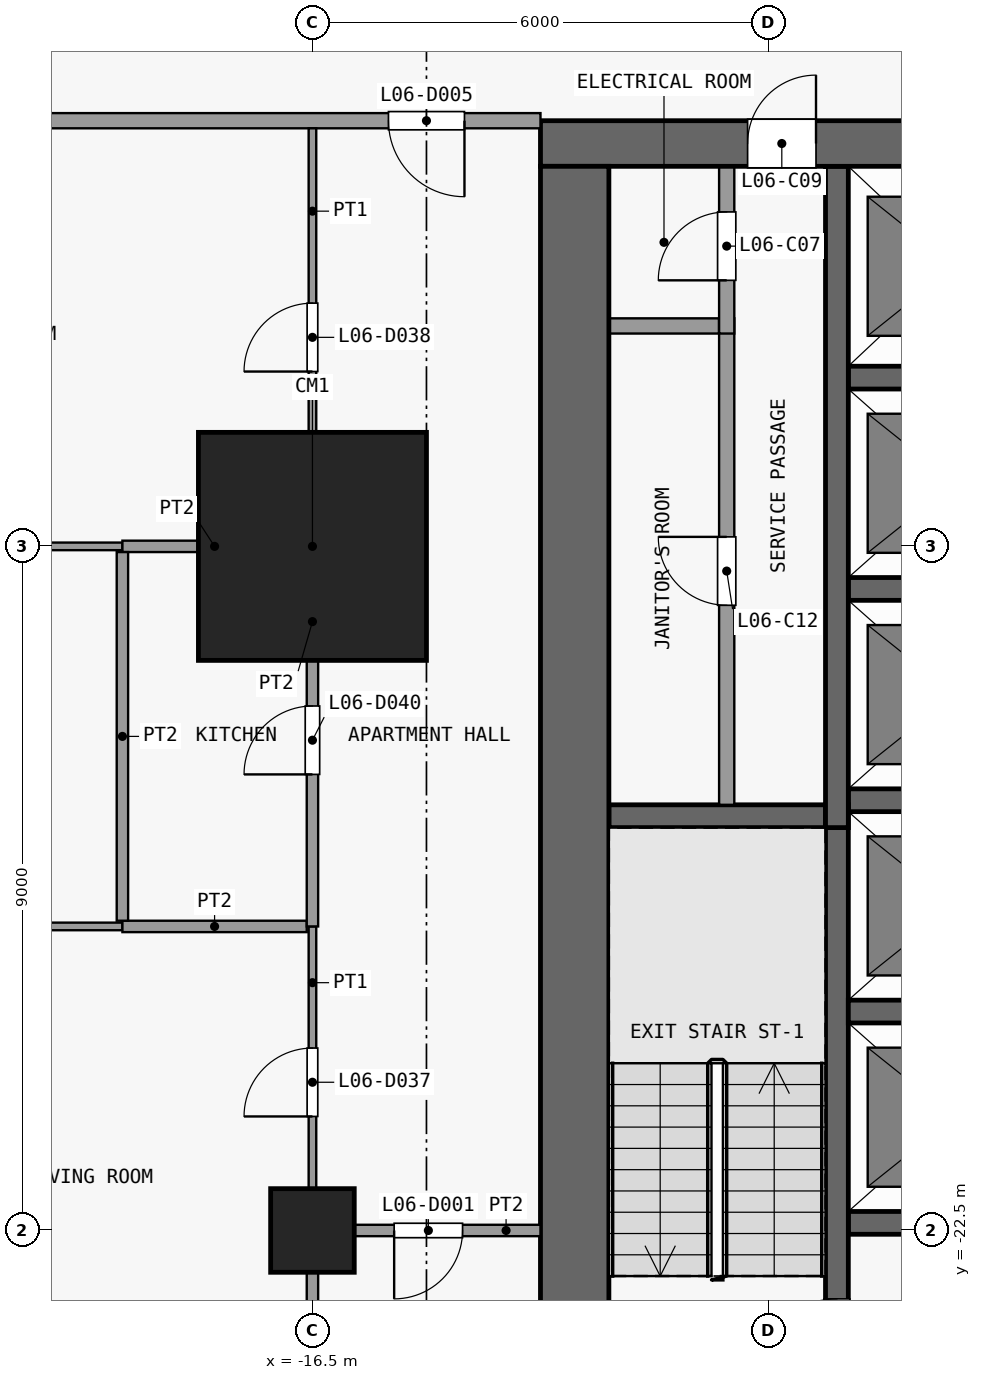
"""IFC4 building model, lengths in metres.
Left out: names, types, materials, properties, quantities, classifications, styles, units other than length and angle.
Written with IfcOpenShell. Run it as: python <this file> out.ifc"""

import sys

from ifc_helpers import new_model, si_unit, direction, frame, frame_2d, origin, origin_2d, place, context, subcontext, project, spatial, rectangle, extrude, element, fill, save


model = new_model("IFC4")
c1 = context("Model", 3, precision=1e-05, world=origin(), true_north=direction((0.0, 1.0)))
c2 = subcontext(c1, "Body", "Model", "MODEL_VIEW")
j1 = project(units=[si_unit("LENGTHUNIT", "METRE"), si_unit("PLANEANGLEUNIT", "RADIAN")], contexts=[c1])
p1 = place(None, origin())
s1 = spatial("IfcSite", under=j1, at=p1, CompositionType="ELEMENT")
p2 = place(p1, origin())
s2 = spatial("IfcBuilding", under=s1, at=p2, CompositionType="ELEMENT")
p3 = place(p2, frame((0.0, 0.0, 32.5)))
s3 = spatial("IfcBuildingStorey", under=s2, at=p3, CompositionType="ELEMENT", Elevation=32.5)
p4 = place(p3, frame((-16.5, -22.5, 0.0), z_axis=(0.0, 0.0, 1.0), x_axis=(1.0, 0.0, 0.0)))
e1 = element("IfcColumn", 1, at=p4, inside=s3, PredefinedType="COLUMN", context=c2, shape_type="SweptSolid", body=[
    extrude(rectangle(XDim=1.1, YDim=1.1, at=origin_2d()), origin(), (0.0, 0.0, 1.0), 3.6),
])
p5 = place(p3, frame((-16.5, -13.5, 0.0), z_axis=(0.0, 0.0, 1.0), x_axis=(1.0, 0.0, 0.0)))
e2 = element("IfcColumn", 2, at=p5, inside=s3, PredefinedType="COLUMN", context=c2, shape_type="SweptSolid", body=[
    extrude(rectangle(XDim=3.0, YDim=3.0, at=origin_2d()), origin(), (0.0, 0.0, 1.0), 3.6),
])
p6 = place(p3, frame((-13.5, -8.2, 0.0), z_axis=(0.0, 0.0, 1.0), x_axis=(1.0, 0.0, 0.0)))
e3 = element("IfcWall", 3, at=p6, inside=s3, PredefinedType="SHEAR", context=c2, shape_type="SweptSolid", body=[
    extrude(rectangle(XDim=27.0, YDim=0.6, at=frame_2d((13.5, 0.0))), origin(), (0.0, 0.0, 1.0), 3.3),
])
p7 = place(p6, frame((7.8, 0.0, 0.0)))
e4 = element("IfcOpeningElement", 4, at=p7, cuts=e3, PredefinedType="OPENING", context=c2, shape_type="SweptSolid", body=[
    extrude(rectangle(XDim=1.8, YDim=2.1, at=frame_2d((0.9, 1.05))), frame((0.0, 0.31, 0.0), z_axis=(0.0, -1.0, 0.0), x_axis=(1.0, 0.0, 0.0)), (0.0, 0.0, 1.0), 0.62),
])
p8 = place(p6, frame((17.4, 0.0, 0.0)))
e5 = element("IfcOpeningElement", 5, at=p8, cuts=e3, PredefinedType="OPENING", context=c2, shape_type="SweptSolid", body=[
    extrude(rectangle(XDim=1.8, YDim=2.1, at=frame_2d((0.9, 1.05))), frame((0.0, 0.31, 0.0), z_axis=(0.0, -1.0, 0.0), x_axis=(1.0, 0.0, 0.0)), (0.0, 0.0, 1.0), 0.62),
])
p9 = place(p6, frame((2.725, 0.0, 0.0)))
e6 = element("IfcOpeningElement", 6, at=p9, cuts=e3, PredefinedType="OPENING", context=c2, shape_type="SweptSolid", body=[
    extrude(rectangle(XDim=0.9, YDim=2.1, at=frame_2d((0.45, 1.05))), frame((0.0, 0.31, 0.0), z_axis=(0.0, -1.0, 0.0), x_axis=(1.0, 0.0, 0.0)), (0.0, 0.0, 1.0), 0.62),
])
p10 = place(p6, frame((23.375, 0.0, 0.0)))
e7 = element("IfcOpeningElement", 7, at=p10, cuts=e3, PredefinedType="OPENING", context=c2, shape_type="SweptSolid", body=[
    extrude(rectangle(XDim=0.9, YDim=2.1, at=frame_2d((0.45, 1.05))), frame((0.0, 0.31, 0.0), z_axis=(0.0, -1.0, 0.0), x_axis=(1.0, 0.0, 0.0)), (0.0, 0.0, 1.0), 0.62),
])
p11 = place(p3, frame((-13.05, -24.6, 0.0), z_axis=(0.0, 0.0, 1.0), x_axis=(0.0, 1.0, 0.0)))
e8 = element("IfcWall", 8, at=p11, inside=s3, PredefinedType="SHEAR", context=c2, shape_type="SweptSolid", body=[
    extrude(rectangle(XDim=16.1, YDim=0.9, at=frame_2d((8.05, 0.0))), origin(), (0.0, 0.0, 1.0), 3.3),
])
for number, where, z_axis, x_axis in (
    (9, (-9.45, -22.4, 0.0), (0.0, 0.0, 1.0), (1.0, 0.0, 0.0)),
    (10, (-9.45, -19.62, 0.0), (0.0, 0.0, 1.0), (1.0, 0.0, 0.0)),
):
    element("IfcWall", number, at=place(p3, frame(where, z_axis=z_axis, x_axis=x_axis)), inside=s3, PredefinedType="SHEAR", context=c2, shape_type="SweptSolid", body=[
        extrude(rectangle(XDim=2.8, YDim=0.3, at=frame_2d((1.4, 0.0))), origin(), (0.0, 0.0, 1.0), 3.3),
    ])
p12 = place(p3, frame((-12.6, -17.05, 0.0), z_axis=(0.0, 0.0, 1.0), x_axis=(1.0, 0.0, 0.0)))
e11 = element("IfcWall", 11, at=p12, inside=s3, PredefinedType="SHEAR", context=c2, shape_type="SweptSolid", body=[
    extrude(rectangle(XDim=2.85, YDim=0.3, at=frame_2d((1.425, 0.0))), origin(), (0.0, 0.0, 1.0), 3.3),
])
for number, where, z_axis, x_axis in (
    (12, (-9.45, -16.84, 0.0), (0.0, 0.0, 1.0), (1.0, 0.0, 0.0)),
    (13, (-9.45, -14.06, 0.0), (0.0, 0.0, 1.0), (1.0, 0.0, 0.0)),
    (14, (-9.45, -11.28, 0.0), (0.0, 0.0, 1.0), (1.0, 0.0, 0.0)),
):
    element("IfcWall", number, at=place(p3, frame(where, z_axis=z_axis, x_axis=x_axis)), inside=s3, PredefinedType="SHEAR", context=c2, shape_type="SweptSolid", body=[
        extrude(rectangle(XDim=2.8, YDim=0.3, at=frame_2d((1.4, 0.0))), origin(), (0.0, 0.0, 1.0), 3.3),
    ])
p13 = place(p3, frame((-12.6, -10.6, 0.0), z_axis=(0.0, 0.0, 1.0), x_axis=(1.0, 0.0, 0.0)))
e15 = element("IfcWall", 15, at=p13, inside=s3, PredefinedType="PARTITIONING", context=c2, shape_type="SweptSolid", body=[
    extrude(rectangle(XDim=1.45, YDim=0.2, at=frame_2d((0.725, 0.0))), origin(), (0.0, 0.0, 1.0), 3.3),
])
p14 = place(p3, frame((-11.05, -16.9, 0.0), z_axis=(0.0, 0.0, 1.0), x_axis=(0.0, 1.0, 0.0)))
e16 = element("IfcWall", 16, at=p14, inside=s3, PredefinedType="PARTITIONING", context=c2, shape_type="SweptSolid", body=[
    extrude(rectangle(XDim=6.4, YDim=0.2, at=frame_2d((3.2, 0.0))), origin(), (0.0, 0.0, 1.0), 3.3),
])
p15 = place(p14, frame((2.625, 0.0, 0.0)))
e17 = element("IfcOpeningElement", 17, at=p15, cuts=e16, PredefinedType="OPENING", context=c2, shape_type="SweptSolid", body=[
    extrude(rectangle(XDim=0.9, YDim=2.1, at=frame_2d((0.45, 1.05))), frame((0.0, 0.11, 0.0), z_axis=(0.0, -1.0, 0.0), x_axis=(1.0, 0.0, 0.0)), (0.0, 0.0, 1.0), 0.22),
])
p16 = place(p3, frame((-11.05, -10.7, 0.0), z_axis=(0.0, 0.0, 1.0), x_axis=(0.0, 1.0, 0.0)))
e18 = element("IfcWall", 18, at=p16, inside=s3, PredefinedType="PARTITIONING", context=c2, shape_type="SweptSolid", body=[
    extrude(rectangle(XDim=2.2, YDim=0.2, at=frame_2d((1.1, 0.0))), origin(), (0.0, 0.0, 1.0), 3.3),
])
p17 = place(p16, frame((0.7, 0.0, 0.0)))
e19 = element("IfcOpeningElement", 19, at=p17, cuts=e18, PredefinedType="OPENING", context=c2, shape_type="SweptSolid", body=[
    extrude(rectangle(XDim=0.9, YDim=2.1, at=frame_2d((0.45, 1.05))), frame((0.0, 0.11, 0.0), z_axis=(0.0, -1.0, 0.0), x_axis=(1.0, 0.0, 0.0)), (0.0, 0.0, 1.0), 0.22),
])
p18 = place(p3, frame((-9.6, -24.6, 0.0), z_axis=(0.0, 0.0, 1.0), x_axis=(0.0, 1.0, 0.0)))
e20 = element("IfcWall", 20, at=p18, inside=s3, PredefinedType="SHEAR", context=c2, shape_type="SweptSolid", body=[
    extrude(rectangle(XDim=7.7, YDim=0.3, at=frame_2d((3.85, 0.0))), origin(), (0.0, 0.0, 1.0), 3.3),
])
p19 = place(p18, frame((0.1, 0.0, 0.0)))
e21 = element("IfcOpeningElement", 21, at=p19, cuts=e20, PredefinedType="OPENING", context=c2, shape_type="SweptSolid", body=[
    extrude(rectangle(XDim=1.1, YDim=2.1, at=frame_2d((0.55, 1.05))), frame((0.0, 0.16, 0.0), z_axis=(0.0, -1.0, 0.0), x_axis=(1.0, 0.0, 0.0)), (0.0, 0.0, 1.0), 0.32),
])
p20 = place(p3, frame((-9.6, -17.2, 0.0), z_axis=(0.0, 0.0, 1.0), x_axis=(0.0, 1.0, 0.0)))
e22 = element("IfcWall", 22, at=p20, inside=s3, PredefinedType="SHEAR", context=c2, shape_type="SweptSolid", body=[
    extrude(rectangle(XDim=8.7, YDim=0.3, at=frame_2d((4.35, 0.0))), origin(), (0.0, 0.0, 1.0), 3.3),
])
p21 = place(p3, frame((-16.425, -22.5, 0.0), z_axis=(0.0, 0.0, 1.0), x_axis=(1.0, 0.0, 0.0)))
e23 = element("IfcWall", 23, at=p21, inside=s3, PredefinedType="PARTITIONING", context=c2, shape_type="SweptSolid", body=[
    extrude(rectangle(XDim=2.925, YDim=0.15, at=frame_2d((1.462, 0.0))), origin(), (0.0, 0.0, 1.0), 3.3),
])
p22 = place(p21, frame((1.0, 0.0, 0.0)))
e24 = element("IfcOpeningElement", 24, at=p22, cuts=e23, PredefinedType="OPENING", context=c2, shape_type="SweptSolid", body=[
    extrude(rectangle(XDim=0.9, YDim=2.1, at=frame_2d((0.45, 1.05))), frame((0.0, 0.085, 0.0), z_axis=(0.0, -1.0, 0.0), x_axis=(1.0, 0.0, 0.0)), (0.0, 0.0, 1.0), 0.17),
])
p23 = place(p3, frame((-25.25, -18.5, 0.0), z_axis=(0.0, 0.0, 1.0), x_axis=(1.0, 0.0, 0.0)))
e25 = element("IfcWall", 25, at=p23, inside=s3, PredefinedType="PARTITIONING", context=c2, shape_type="SweptSolid", body=[
    extrude(rectangle(XDim=6.25, YDim=0.1, at=frame_2d((3.125, 0.0))), origin(), (0.0, 0.0, 1.0), 3.3),
])
p24 = place(p23, frame((2.6, 0.0, 0.0)))
e26 = element("IfcOpeningElement", 26, at=p24, cuts=e25, PredefinedType="OPENING", context=c2, shape_type="SweptSolid", body=[
    extrude(rectangle(XDim=0.9, YDim=2.1, at=frame_2d((0.45, 1.05))), frame((0.0, 0.06, 0.0), z_axis=(0.0, -1.0, 0.0), x_axis=(1.0, 0.0, 0.0)), (0.0, 0.0, 1.0), 0.12),
])
p25 = place(p3, frame((-19.0, -18.5, 0.0), z_axis=(0.0, 0.0, 1.0), x_axis=(1.0, 0.0, 0.0)))
e27 = element("IfcWall", 27, at=p25, inside=s3, PredefinedType="PARTITIONING", context=c2, shape_type="SweptSolid", body=[
    extrude(rectangle(XDim=2.425, YDim=0.15, at=frame_2d((1.212, 0.0))), origin(), (0.0, 0.0, 1.0), 3.3),
])
p26 = place(p3, frame((-25.25, -13.5, 0.0), z_axis=(0.0, 0.0, 1.0), x_axis=(1.0, 0.0, 0.0)))
e28 = element("IfcWall", 28, at=p26, inside=s3, PredefinedType="PARTITIONING", context=c2, shape_type="SweptSolid", body=[
    extrude(rectangle(XDim=6.25, YDim=0.1, at=frame_2d((3.125, 0.0))), origin(), (0.0, 0.0, 1.0), 3.3),
])
p27 = place(p3, frame((-19.0, -13.5, 0.0), z_axis=(0.0, 0.0, 1.0), x_axis=(1.0, 0.0, 0.0)))
e29 = element("IfcWall", 29, at=p27, inside=s3, PredefinedType="PARTITIONING", context=c2, shape_type="SweptSolid", body=[
    extrude(rectangle(XDim=2.425, YDim=0.15, at=frame_2d((1.212, 0.0))), origin(), (0.0, 0.0, 1.0), 3.3),
])
p28 = place(p3, frame((-25.25, -7.9, 0.0), z_axis=(0.0, 0.0, 1.0), x_axis=(1.0, 0.0, 0.0)))
e30 = element("IfcWall", 30, at=p28, inside=s3, PredefinedType="PARTITIONING", context=c2, shape_type="SweptSolid", body=[
    extrude(rectangle(XDim=11.75, YDim=0.2, at=frame_2d((5.875, 0.0))), origin(), (0.0, 0.0, 1.0), 3.3),
])
p29 = place(p28, frame((9.75, 0.0, 0.0)))
e31 = element("IfcOpeningElement", 31, at=p29, cuts=e30, PredefinedType="OPENING", context=c2, shape_type="SweptSolid", body=[
    extrude(rectangle(XDim=1.0, YDim=2.1, at=frame_2d((0.5, 1.05))), frame((0.0, 0.11, 0.0), z_axis=(0.0, -1.0, 0.0), x_axis=(1.0, 0.0, 0.0)), (0.0, 0.0, 1.0), 0.22),
])
p30 = place(p3, frame((-19.0, -18.425, 0.0), z_axis=(0.0, 0.0, 1.0), x_axis=(0.0, 1.0, 0.0)))
e32 = element("IfcWall", 32, at=p30, inside=s3, PredefinedType="PARTITIONING", context=c2, shape_type="SweptSolid", body=[
    extrude(rectangle(XDim=4.85, YDim=0.15, at=frame_2d((2.425, 0.0))), origin(), (0.0, 0.0, 1.0), 3.3),
])
p31 = place(p3, frame((-16.5, -22.5, 0.0), z_axis=(0.0, 0.0, 1.0), x_axis=(0.0, 1.0, 0.0)))
e33 = element("IfcWall", 33, at=p31, inside=s3, PredefinedType="PARTITIONING", context=c2, shape_type="SweptSolid", body=[
    extrude(rectangle(XDim=4.0, YDim=0.1, at=frame_2d((2.0, 0.0))), origin(), (0.0, 0.0, 1.0), 3.3),
])
p32 = place(p31, frame((1.5, 0.0, 0.0)))
e34 = element("IfcOpeningElement", 34, at=p32, cuts=e33, PredefinedType="OPENING", context=c2, shape_type="SweptSolid", body=[
    extrude(rectangle(XDim=0.9, YDim=2.1, at=frame_2d((0.45, 1.05))), frame((0.0, 0.06, 0.0), z_axis=(0.0, -1.0, 0.0), x_axis=(1.0, 0.0, 0.0)), (0.0, 0.0, 1.0), 0.12),
])
p33 = place(p3, frame((-16.5, -13.5, 0.0), z_axis=(0.0, 0.0, 1.0), x_axis=(0.0, 1.0, 0.0)))
e35 = element("IfcWall", 35, at=p33, inside=s3, PredefinedType="PARTITIONING", context=c2, shape_type="SweptSolid", body=[
    extrude(rectangle(XDim=5.5, YDim=0.1, at=frame_2d((2.75, 0.0))), origin(), (0.0, 0.0, 1.0), 3.3),
])
p34 = place(p33, frame((2.3, 0.0, 0.0)))
e36 = element("IfcOpeningElement", 36, at=p34, cuts=e35, PredefinedType="OPENING", context=c2, shape_type="SweptSolid", body=[
    extrude(rectangle(XDim=0.9, YDim=2.1, at=frame_2d((0.45, 1.05))), frame((0.0, 0.06, 0.0), z_axis=(0.0, -1.0, 0.0), x_axis=(1.0, 0.0, 0.0)), (0.0, 0.0, 1.0), 0.12),
])
p35 = place(p3, frame((-16.5, -25.25, 0.0), z_axis=(0.0, 0.0, 1.0), x_axis=(0.0, 1.0, 0.0)))
e37 = element("IfcWall", 37, at=p35, inside=s3, PredefinedType="PARTITIONING", context=c2, shape_type="SweptSolid", body=[
    extrude(rectangle(XDim=2.75, YDim=0.15, at=frame_2d((1.375, 0.0))), origin(), (0.0, 0.0, 1.0), 3.3),
])
p36 = place(p3, frame((-16.5, -18.5, 0.0), z_axis=(0.0, 0.0, 1.0), x_axis=(0.0, 1.0, 0.0)))
e38 = element("IfcWall", 38, at=p36, inside=s3, PredefinedType="PARTITIONING", context=c2, shape_type="SweptSolid", body=[
    extrude(rectangle(XDim=5.0, YDim=0.15, at=frame_2d((2.5, 0.0))), origin(), (0.0, 0.0, 1.0), 3.3),
])
p37 = place(p36, frame((2.0, 0.0, 0.0)))
e39 = element("IfcOpeningElement", 39, at=p37, cuts=e38, PredefinedType="OPENING", context=c2, shape_type="SweptSolid", body=[
    extrude(rectangle(XDim=0.9, YDim=2.1, at=frame_2d((0.45, 1.05))), frame((0.0, 0.085, 0.0), z_axis=(0.0, -1.0, 0.0), x_axis=(1.0, 0.0, 0.0)), (0.0, 0.0, 1.0), 0.17),
])
p38 = place(p17, origin())
e40 = element("IfcDoor", 40, at=p38, inside=s3, OperationType="SINGLE_SWING_LEFT", PredefinedType="DOOR", context=c2, shape_type="SweptSolid", body=[
    extrude(rectangle(XDim=0.9, YDim=2.1, at=frame_2d((0.45, 1.05))), frame((0.0, 0.025, 0.0), z_axis=(0.0, -1.0, 0.0), x_axis=(1.0, 0.0, 0.0)), (0.0, 0.0, 1.0), 0.05),
])
fill(e19, e40)
p39 = place(p9, origin())
e41 = element("IfcDoor", 41, at=p39, inside=s3, OperationType="SINGLE_SWING_RIGHT", PredefinedType="DOOR", context=c2, shape_type="SweptSolid", body=[
    extrude(rectangle(XDim=0.9, YDim=2.1, at=frame_2d((0.45, 1.05))), frame((0.0, 0.025, 0.0), z_axis=(0.0, -1.0, 0.0), x_axis=(1.0, 0.0, 0.0)), (0.0, 0.0, 1.0), 0.05),
])
fill(e6, e41)
p40 = place(p15, origin())
e42 = element("IfcDoor", 42, at=p40, inside=s3, OperationType="SINGLE_SWING_RIGHT", PredefinedType="DOOR", context=c2, shape_type="SweptSolid", body=[
    extrude(rectangle(XDim=0.9, YDim=2.1, at=frame_2d((0.45, 1.05))), frame((0.0, 0.025, 0.0), z_axis=(0.0, -1.0, 0.0), x_axis=(1.0, 0.0, 0.0)), (0.0, 0.0, 1.0), 0.05),
])
fill(e17, e42)
p41 = place(p19, origin())
e43 = element("IfcDoor", 43, at=p41, inside=s3, OperationType="SINGLE_SWING_LEFT", PredefinedType="DOOR", context=c2, shape_type="SweptSolid", body=[
    extrude(rectangle(XDim=1.1, YDim=2.1, at=frame_2d((0.55, 1.05))), frame((0.0, 0.025, 0.0), z_axis=(0.0, -1.0, 0.0), x_axis=(1.0, 0.0, 0.0)), (0.0, 0.0, 1.0), 0.05),
])
fill(e21, e43)
p42 = place(p22, origin())
e44 = element("IfcDoor", 44, at=p42, inside=s3, OperationType="SINGLE_SWING_LEFT", PredefinedType="DOOR", context=c2, shape_type="SweptSolid", body=[
    extrude(rectangle(XDim=0.9, YDim=2.1, at=frame_2d((0.45, 1.05))), frame((0.0, 0.025, 0.0), z_axis=(0.0, -1.0, 0.0), x_axis=(1.0, 0.0, 0.0)), (0.0, 0.0, 1.0), 0.05),
])
fill(e24, e44)
p43 = place(p29, origin())
e45 = element("IfcDoor", 45, at=p43, inside=s3, OperationType="SINGLE_SWING_RIGHT", PredefinedType="DOOR", context=c2, shape_type="SweptSolid", body=[
    extrude(rectangle(XDim=1.0, YDim=2.1, at=frame_2d((0.5, 1.05))), frame((0.0, 0.025, 0.0), z_axis=(0.0, -1.0, 0.0), x_axis=(1.0, 0.0, 0.0)), (0.0, 0.0, 1.0), 0.05),
])
fill(e31, e45)
p44 = place(p32, origin())
e46 = element("IfcDoor", 46, at=p44, inside=s3, OperationType="SINGLE_SWING_RIGHT", PredefinedType="DOOR", context=c2, shape_type="SweptSolid", body=[
    extrude(rectangle(XDim=0.9, YDim=2.1, at=frame_2d((0.45, 1.05))), frame((0.0, 0.025, 0.0), z_axis=(0.0, -1.0, 0.0), x_axis=(1.0, 0.0, 0.0)), (0.0, 0.0, 1.0), 0.05),
])
fill(e34, e46)
p45 = place(p34, origin())
e47 = element("IfcDoor", 47, at=p45, inside=s3, OperationType="SINGLE_SWING_RIGHT", PredefinedType="DOOR", context=c2, shape_type="SweptSolid", body=[
    extrude(rectangle(XDim=0.9, YDim=2.1, at=frame_2d((0.45, 1.05))), frame((0.0, 0.025, 0.0), z_axis=(0.0, -1.0, 0.0), x_axis=(1.0, 0.0, 0.0)), (0.0, 0.0, 1.0), 0.05),
])
fill(e36, e47)
p46 = place(p37, origin())
e48 = element("IfcDoor", 48, at=p46, inside=s3, OperationType="SINGLE_SWING_RIGHT", PredefinedType="DOOR", context=c2, shape_type="SweptSolid", body=[
    extrude(rectangle(XDim=0.9, YDim=2.1, at=frame_2d((0.45, 1.05))), frame((0.0, 0.025, 0.0), z_axis=(0.0, -1.0, 0.0), x_axis=(1.0, 0.0, 0.0)), (0.0, 0.0, 1.0), 0.05),
])
fill(e39, e48)
save(model, sys.argv[1])
